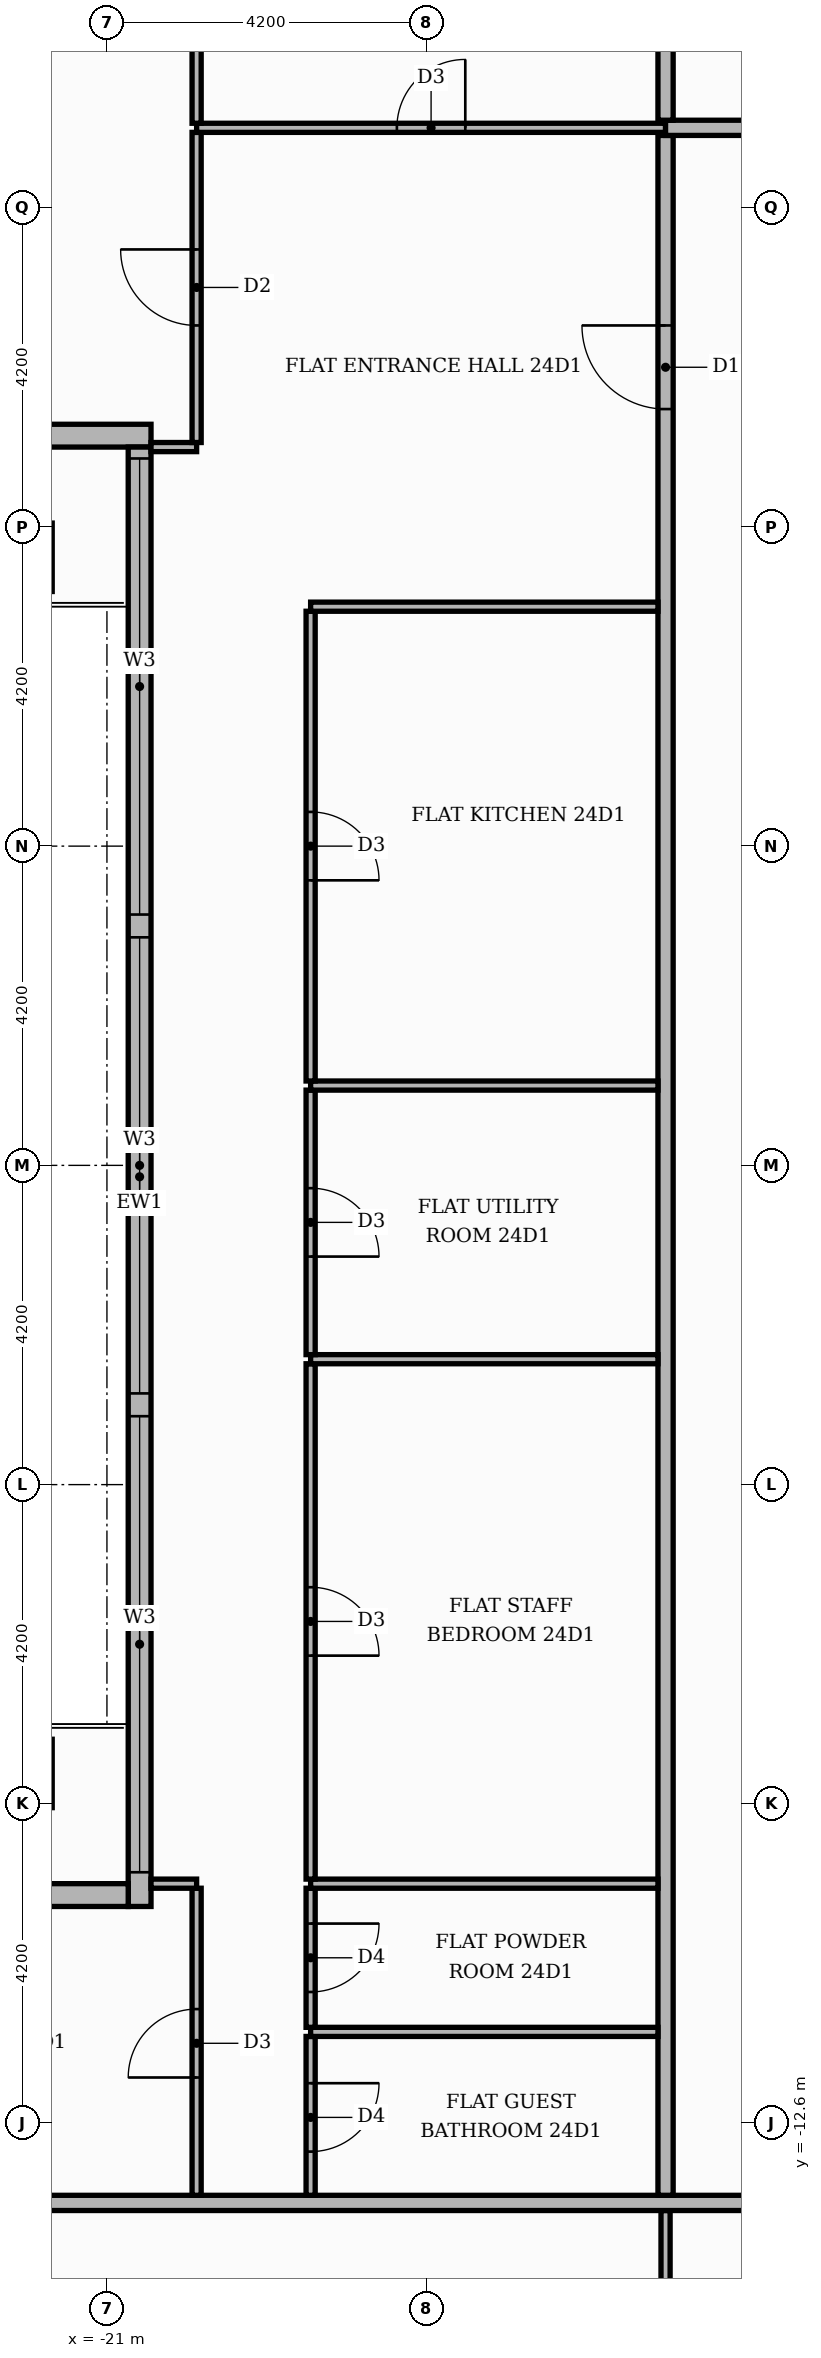
"""IFC4 building model, lengths in metres.
Left out: names, types, materials, properties, quantities, classifications, styles, units other than length and angle.
Written with IfcOpenShell. Run it as: python <this file> out.ifc"""

import sys

from ifc_helpers import new_model, si_unit, direction, frame, frame_2d, origin, place, context, subcontext, project, spatial, rectangle, extrude, element, fill, save


model = new_model("IFC4")
c1 = context("Model", 3, precision=1e-05, world=origin(), true_north=direction((0.0, 1.0)))
c2 = subcontext(c1, "Body", "Model", "MODEL_VIEW")
j1 = project(units=[si_unit("LENGTHUNIT", "METRE"), si_unit("PLANEANGLEUNIT", "RADIAN")], contexts=[c1])
p1 = place(None, origin())
s1 = spatial("IfcSite", under=j1, at=p1, CompositionType="ELEMENT")
p2 = place(p1, origin())
s2 = spatial("IfcBuilding", under=s1, at=p2, CompositionType="ELEMENT")
p3 = place(p2, frame((0.0, 0.0, 102.6)))
s3 = spatial("IfcBuildingStorey", under=s2, at=p3, CompositionType="ELEMENT", Elevation=102.6)
p4 = place(p3, frame((-25.42, 9.6, 0.0), z_axis=(0.0, 0.0, 1.0), x_axis=(1.0, 0.0, 0.0)))
e1 = element("IfcWall", 1, at=p4, inside=s3, PredefinedType="STANDARD", context=c2, shape_type="SweptSolid", body=[
    extrude(rectangle(XDim=5.0, YDim=0.3, at=frame_2d((2.5, 0.0))), origin(), (0.0, 0.0, 1.0), 3.48),
])
p5 = place(p4, frame((1.42, 0.0, 0.0)))
e2 = element("IfcOpeningElement", 2, at=p5, cuts=e1, PredefinedType="OPENING", context=c2, shape_type="SweptSolid", body=[
    extrude(rectangle(XDim=1.8, YDim=2.4, at=frame_2d((0.9, 1.2))), frame((0.0, 0.16, 0.0), z_axis=(0.0, -1.0, 0.0), x_axis=(1.0, 0.0, 0.0)), (0.0, 0.0, 1.0), 0.32),
])
p6 = place(p3, frame((-20.57, 9.45, 0.0), z_axis=(0.0, 0.0, 1.0), x_axis=(0.0, -1.0, 0.0)))
e3 = element("IfcWall", 3, at=p6, inside=s3, PredefinedType="STANDARD", context=c2, shape_type="SweptSolid", body=[
    extrude(rectangle(XDim=19.2, YDim=0.3, at=frame_2d((9.6, 0.0))), origin(), (0.0, 0.0, 1.0), 3.48),
])
p7 = place(p6, frame((0.15, 0.0, 0.9)))
e4 = element("IfcOpeningElement", 4, at=p7, cuts=e3, PredefinedType="OPENING", context=c2, shape_type="SweptSolid", body=[
    extrude(rectangle(XDim=6.0, YDim=2.1, at=frame_2d((3.0, 1.05))), frame((0.0, 0.16, 0.0), z_axis=(0.0, -1.0, 0.0), x_axis=(1.0, 0.0, 0.0)), (0.0, 0.0, 1.0), 0.32),
])
p8 = place(p6, frame((6.45, 0.0, 0.9)))
e5 = element("IfcOpeningElement", 5, at=p8, cuts=e3, PredefinedType="OPENING", context=c2, shape_type="SweptSolid", body=[
    extrude(rectangle(XDim=6.0, YDim=2.1, at=frame_2d((3.0, 1.05))), frame((0.0, 0.16, 0.0), z_axis=(0.0, -1.0, 0.0), x_axis=(1.0, 0.0, 0.0)), (0.0, 0.0, 1.0), 0.32),
])
p9 = place(p6, frame((12.75, 0.0, 0.9)))
e6 = element("IfcOpeningElement", 6, at=p9, cuts=e3, PredefinedType="OPENING", context=c2, shape_type="SweptSolid", body=[
    extrude(rectangle(XDim=6.0, YDim=2.1, at=frame_2d((3.0, 1.05))), frame((0.0, 0.16, 0.0), z_axis=(0.0, -1.0, 0.0), x_axis=(1.0, 0.0, 0.0)), (0.0, 0.0, 1.0), 0.32),
])
p10 = place(p3, frame((-20.72, -9.6, 0.0), z_axis=(0.0, 0.0, 1.0), x_axis=(-1.0, 0.0, 0.0)))
e7 = element("IfcWall", 7, at=p10, inside=s3, PredefinedType="STANDARD", context=c2, shape_type="SweptSolid", body=[
    extrude(rectangle(XDim=5.0, YDim=0.3, at=frame_2d((2.5, 0.0))), origin(), (0.0, 0.0, 1.0), 3.48),
])
p11 = place(p10, frame((1.48, 0.0, 0.0)))
e8 = element("IfcOpeningElement", 8, at=p11, cuts=e7, PredefinedType="OPENING", context=c2, shape_type="SweptSolid", body=[
    extrude(rectangle(XDim=1.8, YDim=2.4, at=frame_2d((0.9, 1.2))), frame((0.0, 0.16, 0.0), z_axis=(0.0, -1.0, 0.0), x_axis=(1.0, 0.0, 0.0)), (0.0, 0.0, 1.0), 0.32),
])
p12 = place(p3, frame((-13.65, -20.66, 0.0), z_axis=(0.0, 0.0, 1.0), x_axis=(0.0, 1.0, 0.0)))
e9 = element("IfcWall", 9, at=p12, inside=s3, PredefinedType="PARTITIONING", context=c2, shape_type="SweptSolid", body=[
    extrude(rectangle(XDim=6.91, YDim=0.12, at=frame_2d((3.455, 0.0))), origin(), (0.0, 0.0, 1.0), 3.48),
])
p13 = place(p12, frame((3.025, 0.0, 0.0)))
e10 = element("IfcOpeningElement", 10, at=p13, cuts=e9, PredefinedType="OPENING", context=c2, shape_type="SweptSolid", body=[
    extrude(rectangle(XDim=0.9, YDim=2.1, at=frame_2d((0.45, 1.05))), frame((0.0, 0.07, 0.0), z_axis=(0.0, -1.0, 0.0), x_axis=(1.0, 0.0, 0.0)), (0.0, 0.0, 1.0), 0.14),
])
p14 = place(p3, frame((-25.42, -13.65, 0.0), z_axis=(0.0, 0.0, 1.0), x_axis=(1.0, 0.0, 0.0)))
e11 = element("IfcWall", 11, at=p14, inside=s3, PredefinedType="PARTITIONING", context=c2, shape_type="SweptSolid", body=[
    extrude(rectangle(XDim=39.07, YDim=0.2, at=frame_2d((19.535, 0.0))), origin(), (0.0, 0.0, 1.0), 3.48),
])
p15 = place(p14, frame((14.37, 0.0, 0.0)))
e12 = element("IfcOpeningElement", 12, at=p15, cuts=e11, PredefinedType="OPENING", context=c2, shape_type="SweptSolid", body=[
    extrude(rectangle(XDim=1.1, YDim=2.4, at=frame_2d((0.55, 1.2))), frame((0.0, 0.11, 0.0), z_axis=(0.0, -1.0, 0.0), x_axis=(1.0, 0.0, 0.0)), (0.0, 0.0, 1.0), 0.22),
])
p16 = place(p3, frame((-19.82, -13.55, 0.0), z_axis=(0.0, 0.0, 1.0), x_axis=(0.0, 1.0, 0.0)))
e13 = element("IfcWall", 13, at=p16, inside=s3, PredefinedType="PARTITIONING", context=c2, shape_type="SweptSolid", body=[
    extrude(rectangle(XDim=4.04, YDim=0.12, at=frame_2d((2.02, 0.0))), origin(), (0.0, 0.0, 1.0), 3.48),
])
p17 = place(p16, frame((1.55, 0.0, 0.0)))
e14 = element("IfcOpeningElement", 14, at=p17, cuts=e13, PredefinedType="OPENING", context=c2, shape_type="SweptSolid", body=[
    extrude(rectangle(XDim=0.9, YDim=2.1, at=frame_2d((0.45, 1.05))), frame((0.0, 0.07, 0.0), z_axis=(0.0, -1.0, 0.0), x_axis=(1.0, 0.0, 0.0)), (0.0, 0.0, 1.0), 0.14),
])
p18 = place(p3, frame((-18.32, -13.55, 0.0), z_axis=(0.0, 0.0, 1.0), x_axis=(0.0, 1.0, 0.0)))
e15 = element("IfcWall", 15, at=p18, inside=s3, PredefinedType="PARTITIONING", context=c2, shape_type="SweptSolid", body=[
    extrude(rectangle(XDim=2.09, YDim=0.12, at=frame_2d((1.045, 0.0))), origin(), (0.0, 0.0, 1.0), 3.48),
])
p19 = place(p18, frame((0.575, 0.0, 0.0)))
e16 = element("IfcOpeningElement", 16, at=p19, cuts=e15, PredefinedType="OPENING", context=c2, shape_type="SweptSolid", body=[
    extrude(rectangle(XDim=0.9, YDim=2.1, at=frame_2d((0.45, 1.05))), frame((0.0, 0.07, 0.0), z_axis=(0.0, -1.0, 0.0), x_axis=(1.0, 0.0, 0.0)), (0.0, 0.0, 1.0), 0.14),
])
p20 = place(p3, frame((-13.65, -13.55, 0.0), z_axis=(0.0, 0.0, 1.0), x_axis=(0.0, 1.0, 0.0)))
e17 = element("IfcWall", 17, at=p20, inside=s3, PredefinedType="PARTITIONING", context=c2, shape_type="SweptSolid", body=[
    extrude(rectangle(XDim=27.1, YDim=0.2, at=frame_2d((13.55, 0.0))), origin(), (0.0, 0.0, 1.0), 3.48),
])
p21 = place(p20, frame((23.5, 0.0, 0.0)))
e18 = element("IfcOpeningElement", 18, at=p21, cuts=e17, PredefinedType="OPENING", context=c2, shape_type="SweptSolid", body=[
    extrude(rectangle(XDim=1.1, YDim=2.4, at=frame_2d((0.55, 1.2))), frame((0.0, 0.11, 0.0), z_axis=(0.0, -1.0, 0.0), x_axis=(1.0, 0.0, 0.0)), (0.0, 0.0, 1.0), 0.22),
])
p22 = place(p3, frame((-18.32, -11.4, 0.0), z_axis=(0.0, 0.0, 1.0), x_axis=(1.0, 0.0, 0.0)))
e19 = element("IfcWall", 19, at=p22, inside=s3, PredefinedType="PARTITIONING", context=c2, shape_type="SweptSolid", body=[
    extrude(rectangle(XDim=4.57, YDim=0.12, at=frame_2d((2.285, 0.0))), origin(), (0.0, 0.0, 1.0), 3.48),
])
p23 = place(p3, frame((-18.32, -11.34, 0.0), z_axis=(0.0, 0.0, 1.0), x_axis=(0.0, 1.0, 0.0)))
e20 = element("IfcWall", 20, at=p23, inside=s3, PredefinedType="PARTITIONING", context=c2, shape_type="SweptSolid", body=[
    extrude(rectangle(XDim=1.83, YDim=0.12, at=frame_2d((0.915, 0.0))), origin(), (0.0, 0.0, 1.0), 3.48),
])
p24 = place(p23, frame((0.465, 0.0, 0.0)))
e21 = element("IfcOpeningElement", 21, at=p24, cuts=e20, PredefinedType="OPENING", context=c2, shape_type="SweptSolid", body=[
    extrude(rectangle(XDim=0.9, YDim=2.1, at=frame_2d((0.45, 1.05))), frame((0.0, 0.07, 0.0), z_axis=(0.0, -1.0, 0.0), x_axis=(1.0, 0.0, 0.0)), (0.0, 0.0, 1.0), 0.14),
])
p25 = place(p3, frame((-20.42, -9.45, 0.0), z_axis=(0.0, 0.0, 1.0), x_axis=(1.0, 0.0, 0.0)))
e22 = element("IfcWall", 22, at=p25, inside=s3, PredefinedType="PARTITIONING", context=c2, shape_type="SweptSolid", body=[
    extrude(rectangle(XDim=0.6, YDim=0.12, at=frame_2d((0.3, 0.0))), origin(), (0.0, 0.0, 1.0), 3.48),
])
p26 = place(p3, frame((-18.32, -9.45, 0.0), z_axis=(0.0, 0.0, 1.0), x_axis=(1.0, 0.0, 0.0)))
e23 = element("IfcWall", 23, at=p26, inside=s3, PredefinedType="PARTITIONING", context=c2, shape_type="SweptSolid", body=[
    extrude(rectangle(XDim=4.57, YDim=0.12, at=frame_2d((2.285, 0.0))), origin(), (0.0, 0.0, 1.0), 3.48),
])
p27 = place(p3, frame((-18.32, -9.39, 0.0), z_axis=(0.0, 0.0, 1.0), x_axis=(0.0, 1.0, 0.0)))
e24 = element("IfcWall", 24, at=p27, inside=s3, PredefinedType="PARTITIONING", context=c2, shape_type="SweptSolid", body=[
    extrude(rectangle(XDim=6.78, YDim=0.12, at=frame_2d((3.39, 0.0))), origin(), (0.0, 0.0, 1.0), 3.48),
])
p28 = place(p27, frame((2.94, 0.0, 0.0)))
e25 = element("IfcOpeningElement", 25, at=p28, cuts=e24, PredefinedType="OPENING", context=c2, shape_type="SweptSolid", body=[
    extrude(rectangle(XDim=0.9, YDim=2.1, at=frame_2d((0.45, 1.05))), frame((0.0, 0.07, 0.0), z_axis=(0.0, -1.0, 0.0), x_axis=(1.0, 0.0, 0.0)), (0.0, 0.0, 1.0), 0.14),
])
p29 = place(p3, frame((-18.32, -2.55, 0.0), z_axis=(0.0, 0.0, 1.0), x_axis=(1.0, 0.0, 0.0)))
e26 = element("IfcWall", 26, at=p29, inside=s3, PredefinedType="PARTITIONING", context=c2, shape_type="SweptSolid", body=[
    extrude(rectangle(XDim=4.57, YDim=0.12, at=frame_2d((2.285, 0.0))), origin(), (0.0, 0.0, 1.0), 3.48),
])
p30 = place(p3, frame((-18.32, -2.49, 0.0), z_axis=(0.0, 0.0, 1.0), x_axis=(0.0, 1.0, 0.0)))
e27 = element("IfcWall", 27, at=p30, inside=s3, PredefinedType="PARTITIONING", context=c2, shape_type="SweptSolid", body=[
    extrude(rectangle(XDim=3.48, YDim=0.12, at=frame_2d((1.74, 0.0))), origin(), (0.0, 0.0, 1.0), 3.48),
])
p31 = place(p30, frame((1.29, 0.0, 0.0)))
e28 = element("IfcOpeningElement", 28, at=p31, cuts=e27, PredefinedType="OPENING", context=c2, shape_type="SweptSolid", body=[
    extrude(rectangle(XDim=0.9, YDim=2.1, at=frame_2d((0.45, 1.05))), frame((0.0, 0.07, 0.0), z_axis=(0.0, -1.0, 0.0), x_axis=(1.0, 0.0, 0.0)), (0.0, 0.0, 1.0), 0.14),
])
p32 = place(p3, frame((-18.32, 1.05, 0.0), z_axis=(0.0, 0.0, 1.0), x_axis=(1.0, 0.0, 0.0)))
e29 = element("IfcWall", 29, at=p32, inside=s3, PredefinedType="PARTITIONING", context=c2, shape_type="SweptSolid", body=[
    extrude(rectangle(XDim=4.57, YDim=0.12, at=frame_2d((2.285, 0.0))), origin(), (0.0, 0.0, 1.0), 3.48),
])
p33 = place(p3, frame((-18.32, 1.11, 0.0), z_axis=(0.0, 0.0, 1.0), x_axis=(0.0, 1.0, 0.0)))
e30 = element("IfcWall", 30, at=p33, inside=s3, PredefinedType="PARTITIONING", context=c2, shape_type="SweptSolid", body=[
    extrude(rectangle(XDim=6.18, YDim=0.12, at=frame_2d((3.09, 0.0))), origin(), (0.0, 0.0, 1.0), 3.48),
])
p34 = place(p33, frame((2.64, 0.0, 0.0)))
e31 = element("IfcOpeningElement", 31, at=p34, cuts=e30, PredefinedType="OPENING", context=c2, shape_type="SweptSolid", body=[
    extrude(rectangle(XDim=0.9, YDim=2.1, at=frame_2d((0.45, 1.05))), frame((0.0, 0.07, 0.0), z_axis=(0.0, -1.0, 0.0), x_axis=(1.0, 0.0, 0.0)), (0.0, 0.0, 1.0), 0.14),
])
p35 = place(p3, frame((-18.32, 7.35, 0.0), z_axis=(0.0, 0.0, 1.0), x_axis=(1.0, 0.0, 0.0)))
e32 = element("IfcWall", 32, at=p35, inside=s3, PredefinedType="PARTITIONING", context=c2, shape_type="SweptSolid", body=[
    extrude(rectangle(XDim=4.57, YDim=0.12, at=frame_2d((2.285, 0.0))), origin(), (0.0, 0.0, 1.0), 3.48),
])
p36 = place(p3, frame((-20.42, 9.45, 0.0), z_axis=(0.0, 0.0, 1.0), x_axis=(1.0, 0.0, 0.0)))
e33 = element("IfcWall", 33, at=p36, inside=s3, PredefinedType="PARTITIONING", context=c2, shape_type="SweptSolid", body=[
    extrude(rectangle(XDim=0.6, YDim=0.12, at=frame_2d((0.3, 0.0))), origin(), (0.0, 0.0, 1.0), 3.48),
])
p37 = place(p3, frame((-19.82, 9.51, 0.0), z_axis=(0.0, 0.0, 1.0), x_axis=(0.0, 1.0, 0.0)))
e34 = element("IfcWall", 34, at=p37, inside=s3, PredefinedType="PARTITIONING", context=c2, shape_type="SweptSolid", body=[
    extrude(rectangle(XDim=4.08, YDim=0.12, at=frame_2d((2.04, 0.0))), origin(), (0.0, 0.0, 1.0), 3.48),
])
p38 = place(p37, frame((1.54, 0.0, 0.0)))
e35 = element("IfcOpeningElement", 35, at=p38, cuts=e34, PredefinedType="OPENING", context=c2, shape_type="SweptSolid", body=[
    extrude(rectangle(XDim=1.0, YDim=2.1, at=frame_2d((0.5, 1.05))), frame((0.0, 0.07, 0.0), z_axis=(0.0, -1.0, 0.0), x_axis=(1.0, 0.0, 0.0)), (0.0, 0.0, 1.0), 0.14),
])
p39 = place(p3, frame((-19.82, 13.65, 0.0), z_axis=(0.0, 0.0, 1.0), x_axis=(1.0, 0.0, 0.0)))
e36 = element("IfcWall", 36, at=p39, inside=s3, PredefinedType="PARTITIONING", context=c2, shape_type="SweptSolid", body=[
    extrude(rectangle(XDim=6.17, YDim=0.12, at=frame_2d((3.085, 0.0))), origin(), (0.0, 0.0, 1.0), 3.48),
])
p40 = place(p39, frame((2.635, 0.0, 0.0)))
e37 = element("IfcOpeningElement", 37, at=p40, cuts=e36, PredefinedType="OPENING", context=c2, shape_type="SweptSolid", body=[
    extrude(rectangle(XDim=0.9, YDim=2.1, at=frame_2d((0.45, 1.05))), frame((0.0, 0.07, 0.0), z_axis=(0.0, -1.0, 0.0), x_axis=(1.0, 0.0, 0.0)), (0.0, 0.0, 1.0), 0.14),
])
p41 = place(p3, frame((-13.65, 13.65, 0.0), z_axis=(0.0, 0.0, 1.0), x_axis=(1.0, 0.0, 0.0)))
e38 = element("IfcWall", 38, at=p41, inside=s3, PredefinedType="PARTITIONING", context=c2, shape_type="SweptSolid", body=[
    extrude(rectangle(XDim=39.07, YDim=0.2, at=frame_2d((19.535, 0.0))), origin(), (0.0, 0.0, 1.0), 3.48),
])
p42 = place(p41, frame((24.65, 0.0, 0.0)))
e39 = element("IfcOpeningElement", 39, at=p42, cuts=e38, PredefinedType="OPENING", context=c2, shape_type="SweptSolid", body=[
    extrude(rectangle(XDim=1.1, YDim=2.4, at=frame_2d((0.55, 1.2))), frame((0.0, 0.11, 0.0), z_axis=(0.0, -1.0, 0.0), x_axis=(1.0, 0.0, 0.0)), (0.0, 0.0, 1.0), 0.22),
])
p43 = place(p41, frame((14.15, 0.0, 0.0)))
e40 = element("IfcOpeningElement", 40, at=p43, cuts=e38, PredefinedType="OPENING", context=c2, shape_type="SweptSolid", body=[
    extrude(rectangle(XDim=1.1, YDim=2.4, at=frame_2d((0.55, 1.2))), frame((0.0, 0.11, 0.0), z_axis=(0.0, -1.0, 0.0), x_axis=(1.0, 0.0, 0.0)), (0.0, 0.0, 1.0), 0.22),
])
p44 = place(p3, frame((-19.82, 13.71, 0.0), z_axis=(0.0, 0.0, 1.0), x_axis=(0.0, 1.0, 0.0)))
e41 = element("IfcWall", 41, at=p44, inside=s3, PredefinedType="PARTITIONING", context=c2, shape_type="SweptSolid", body=[
    extrude(rectangle(XDim=3.69, YDim=0.12, at=frame_2d((1.845, 0.0))), origin(), (0.0, 0.0, 1.0), 3.48),
])
p45 = place(p3, frame((-13.65, 13.75, 0.0), z_axis=(0.0, 0.0, 1.0), x_axis=(0.0, 1.0, 0.0)))
e42 = element("IfcWall", 42, at=p45, inside=s3, PredefinedType="PARTITIONING", context=c2, shape_type="SweptSolid", body=[
    extrude(rectangle(XDim=11.67, YDim=0.2, at=frame_2d((5.835, 0.0))), origin(), (0.0, 0.0, 1.0), 3.48),
])
p46 = place(p7, origin())
e43 = element("IfcWindow", 43, at=p46, inside=s3, PartitioningType="SINGLE_PANEL", PredefinedType="WINDOW", context=c2, shape_type="SweptSolid", body=[
    extrude(rectangle(XDim=6.0, YDim=2.1, at=frame_2d((3.0, 1.05))), frame((0.0, 0.03, 0.0), z_axis=(0.0, -1.0, 0.0), x_axis=(1.0, 0.0, 0.0)), (0.0, 0.0, 1.0), 0.06),
])
fill(e4, e43)
p47 = place(p8, origin())
e44 = element("IfcWindow", 44, at=p47, inside=s3, PartitioningType="SINGLE_PANEL", PredefinedType="WINDOW", context=c2, shape_type="SweptSolid", body=[
    extrude(rectangle(XDim=6.0, YDim=2.1, at=frame_2d((3.0, 1.05))), frame((0.0, 0.03, 0.0), z_axis=(0.0, -1.0, 0.0), x_axis=(1.0, 0.0, 0.0)), (0.0, 0.0, 1.0), 0.06),
])
fill(e5, e44)
p48 = place(p9, origin())
e45 = element("IfcWindow", 45, at=p48, inside=s3, PartitioningType="SINGLE_PANEL", PredefinedType="WINDOW", context=c2, shape_type="SweptSolid", body=[
    extrude(rectangle(XDim=6.0, YDim=2.1, at=frame_2d((3.0, 1.05))), frame((0.0, 0.03, 0.0), z_axis=(0.0, -1.0, 0.0), x_axis=(1.0, 0.0, 0.0)), (0.0, 0.0, 1.0), 0.06),
])
fill(e6, e45)
p49 = place(p21, origin())
e46 = element("IfcDoor", 46, at=p49, inside=s3, OperationType="SINGLE_SWING_RIGHT", PredefinedType="DOOR", context=c2, shape_type="SweptSolid", body=[
    extrude(rectangle(XDim=1.1, YDim=2.4, at=frame_2d((0.55, 1.2))), frame((0.0, 0.025, 0.0), z_axis=(0.0, -1.0, 0.0), x_axis=(1.0, 0.0, 0.0)), (0.0, 0.0, 1.0), 0.05),
])
fill(e18, e46)
p50 = place(p40, origin())
e47 = element("IfcDoor", 47, at=p50, inside=s3, OperationType="SINGLE_SWING_RIGHT", PredefinedType="DOOR", context=c2, shape_type="SweptSolid", body=[
    extrude(rectangle(XDim=0.9, YDim=2.1, at=frame_2d((0.45, 1.05))), frame((0.0, 0.025, 0.0), z_axis=(0.0, -1.0, 0.0), x_axis=(1.0, 0.0, 0.0)), (0.0, 0.0, 1.0), 0.05),
])
fill(e37, e47)
p51 = place(p34, frame((0.9, 0.0, 0.0), z_axis=(0.0, 0.0, 1.0), x_axis=(-1.0, 0.0, 0.0)))
e48 = element("IfcDoor", 48, at=p51, inside=s3, OperationType="SINGLE_SWING_LEFT", PredefinedType="DOOR", context=c2, shape_type="SweptSolid", body=[
    extrude(rectangle(XDim=0.9, YDim=2.1, at=frame_2d((0.45, 1.05))), frame((0.0, 0.025, 0.0), z_axis=(0.0, -1.0, 0.0), x_axis=(1.0, 0.0, 0.0)), (0.0, 0.0, 1.0), 0.05),
])
fill(e31, e48)
p52 = place(p31, frame((0.9, 0.0, 0.0), z_axis=(0.0, 0.0, 1.0), x_axis=(-1.0, 0.0, 0.0)))
e49 = element("IfcDoor", 49, at=p52, inside=s3, OperationType="SINGLE_SWING_LEFT", PredefinedType="DOOR", context=c2, shape_type="SweptSolid", body=[
    extrude(rectangle(XDim=0.9, YDim=2.1, at=frame_2d((0.45, 1.05))), frame((0.0, 0.025, 0.0), z_axis=(0.0, -1.0, 0.0), x_axis=(1.0, 0.0, 0.0)), (0.0, 0.0, 1.0), 0.05),
])
fill(e28, e49)
p53 = place(p28, frame((0.9, 0.0, 0.0), z_axis=(0.0, 0.0, 1.0), x_axis=(-1.0, 0.0, 0.0)))
e50 = element("IfcDoor", 50, at=p53, inside=s3, OperationType="SINGLE_SWING_LEFT", PredefinedType="DOOR", context=c2, shape_type="SweptSolid", body=[
    extrude(rectangle(XDim=0.9, YDim=2.1, at=frame_2d((0.45, 1.05))), frame((0.0, 0.025, 0.0), z_axis=(0.0, -1.0, 0.0), x_axis=(1.0, 0.0, 0.0)), (0.0, 0.0, 1.0), 0.05),
])
fill(e25, e50)
p54 = place(p24, frame((0.9, 0.0, 0.0), z_axis=(0.0, 0.0, 1.0), x_axis=(-1.0, 0.0, 0.0)))
e51 = element("IfcDoor", 51, at=p54, inside=s3, OperationType="SINGLE_SWING_RIGHT", PredefinedType="DOOR", context=c2, shape_type="SweptSolid", body=[
    extrude(rectangle(XDim=0.9, YDim=2.1, at=frame_2d((0.45, 1.05))), frame((0.0, 0.025, 0.0), z_axis=(0.0, -1.0, 0.0), x_axis=(1.0, 0.0, 0.0)), (0.0, 0.0, 1.0), 0.05),
])
fill(e21, e51)
p55 = place(p19, frame((0.9, 0.0, 0.0), z_axis=(0.0, 0.0, 1.0), x_axis=(-1.0, 0.0, 0.0)))
e52 = element("IfcDoor", 52, at=p55, inside=s3, OperationType="SINGLE_SWING_RIGHT", PredefinedType="DOOR", context=c2, shape_type="SweptSolid", body=[
    extrude(rectangle(XDim=0.9, YDim=2.1, at=frame_2d((0.45, 1.05))), frame((0.0, 0.025, 0.0), z_axis=(0.0, -1.0, 0.0), x_axis=(1.0, 0.0, 0.0)), (0.0, 0.0, 1.0), 0.05),
])
fill(e16, e52)
p56 = place(p38, origin())
e53 = element("IfcDoor", 53, at=p56, inside=s3, OperationType="SINGLE_SWING_RIGHT", PredefinedType="DOOR", context=c2, shape_type="SweptSolid", body=[
    extrude(rectangle(XDim=1.0, YDim=2.1, at=frame_2d((0.5, 1.05))), frame((0.0, 0.025, 0.0), z_axis=(0.0, -1.0, 0.0), x_axis=(1.0, 0.0, 0.0)), (0.0, 0.0, 1.0), 0.05),
])
fill(e35, e53)
p57 = place(p17, origin())
e54 = element("IfcDoor", 54, at=p57, inside=s3, OperationType="SINGLE_SWING_LEFT", PredefinedType="DOOR", context=c2, shape_type="SweptSolid", body=[
    extrude(rectangle(XDim=0.9, YDim=2.1, at=frame_2d((0.45, 1.05))), frame((0.0, 0.025, 0.0), z_axis=(0.0, -1.0, 0.0), x_axis=(1.0, 0.0, 0.0)), (0.0, 0.0, 1.0), 0.05),
])
fill(e14, e54)
save(model, sys.argv[1])
